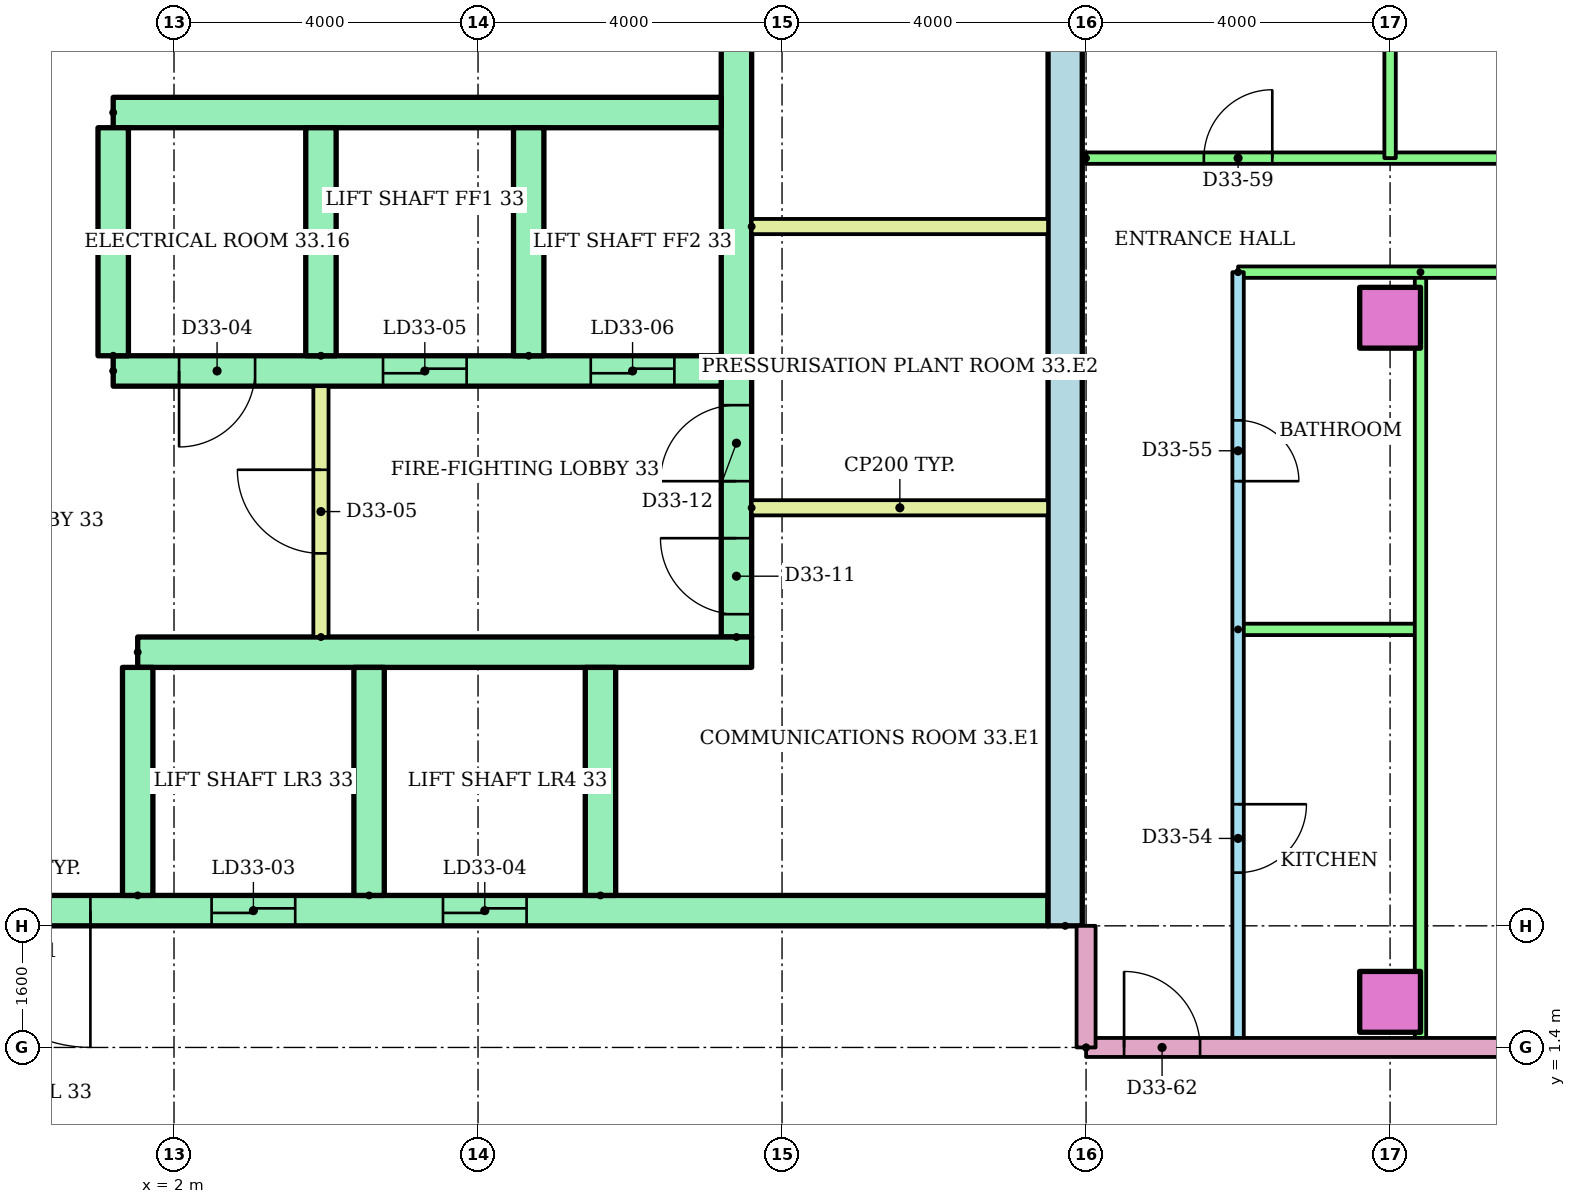
"""IFC4 building model, lengths in metres.
Left out: names, types, materials, properties, quantities, classifications, styles, units other than length and angle.
Written with IfcOpenShell. Run it as: python <this file> out.ifc"""

import sys

from ifc_helpers import new_model, si_unit, direction, frame, frame_2d, origin, origin_2d, place, context, subcontext, project, spatial, rectangle, extrude, element, fill, save


model = new_model("IFC4")
c1 = context("Model", 3, precision=1e-05, world=origin(), true_north=direction((0.0, 1.0)))
c2 = subcontext(c1, "Body", "Model", "MODEL_VIEW")
j1 = project(units=[si_unit("LENGTHUNIT", "METRE"), si_unit("PLANEANGLEUNIT", "RADIAN")], contexts=[c1])
p1 = place(None, origin())
s1 = spatial("IfcSite", under=j1, at=p1, CompositionType="ELEMENT")
p2 = place(p1, origin())
s2 = spatial("IfcBuilding", under=s1, at=p2, CompositionType="ELEMENT")
p3 = place(p2, frame((0.0, 0.0, 129.4)))
s3 = spatial("IfcBuildingStorey", under=s2, at=p3, CompositionType="ELEMENT", Elevation=129.4)
for number, where in (
    (1, (18.0, 2.0, 0.0)),
    (2, (18.0, 11.0, 0.0)),
):
    element("IfcColumn", number, at=place(p3, frame(where)), inside=s3, PredefinedType="COLUMN", context=c2, shape_type="SweptSolid", body=[
        extrude(rectangle(XDim=0.8, YDim=0.8, at=origin_2d()), origin(), (0.0, 0.0, 1.0), 3.2),
    ])
p4 = place(p3, frame((13.725, 3.0, 0.0), z_axis=(0.0, 0.0, 1.0), x_axis=(0.0, 1.0, 0.0)))
e3 = element("IfcWall", 3, at=p4, inside=s3, PredefinedType="SHEAR", context=c2, shape_type="SweptSolid", body=[
    extrude(rectangle(XDim=17.0, YDim=0.45, at=frame_2d((8.5, 0.0))), origin(), (0.0, 0.0, 1.0), 2.92),
])
p5 = place(p3, frame((9.4, 6.8, 0.0), z_axis=(0.0, 0.0, 1.0), x_axis=(0.0, 1.0, 0.0)))
e4 = element("IfcWall", 4, at=p5, inside=s3, PredefinedType="SHEAR", context=c2, shape_type="SweptSolid", body=[
    extrude(rectangle(XDim=12.7, YDim=0.4, at=frame_2d((6.35, 0.0))), origin(), (0.0, 0.0, 1.0), 2.92),
])
p6 = place(p5, frame((0.3, 0.0, 0.0)))
e5 = element("IfcOpeningElement", 5, at=p6, cuts=e4, PredefinedType="OPENING", context=c2, shape_type="SweptSolid", body=[
    extrude(rectangle(XDim=1.0, YDim=2.1, at=frame_2d((0.5, 1.05))), frame((0.0, 0.21, 0.0), z_axis=(0.0, -1.0, 0.0), x_axis=(1.0, 0.0, 0.0)), (0.0, 0.0, 1.0), 0.42),
])
p7 = place(p5, frame((2.05, 0.0, 0.0)))
e6 = element("IfcOpeningElement", 6, at=p7, cuts=e4, PredefinedType="OPENING", context=c2, shape_type="SweptSolid", body=[
    extrude(rectangle(XDim=1.0, YDim=2.1, at=frame_2d((0.5, 1.05))), frame((0.0, 0.21, 0.0), z_axis=(0.0, -1.0, 0.0), x_axis=(1.0, 0.0, 0.0)), (0.0, 0.0, 1.0), 0.42),
])
p8 = place(p5, frame((7.925, 0.0, 0.0)))
e7 = element("IfcOpeningElement", 7, at=p8, cuts=e4, PredefinedType="OPENING", context=c2, shape_type="SweptSolid", body=[
    extrude(rectangle(XDim=1.0, YDim=2.1, at=frame_2d((0.5, 1.05))), frame((0.0, 0.21, 0.0), z_axis=(0.0, -1.0, 0.0), x_axis=(1.0, 0.0, 0.0)), (0.0, 0.0, 1.0), 0.42),
])
p9 = place(p3, frame((-13.5, 3.2, 0.0)))
e8 = element("IfcWall", 8, at=p9, inside=s3, PredefinedType="SHEAR", context=c2, shape_type="SweptSolid", body=[
    extrude(rectangle(XDim=27.0, YDim=0.4, at=frame_2d((13.5, 0.0))), origin(), (0.0, 0.0, 1.0), 2.92),
])
p10 = place(p9, frame((6.861, 0.0, 0.0)))
e9 = element("IfcOpeningElement", 9, at=p10, cuts=e8, PredefinedType="OPENING", context=c2, shape_type="SweptSolid", body=[
    extrude(rectangle(XDim=1.1, YDim=2.1, at=frame_2d((0.55, 1.05))), frame((0.0, 0.21, 0.0), z_axis=(0.0, -1.0, 0.0), x_axis=(1.0, 0.0, 0.0)), (0.0, 0.0, 1.0), 0.42),
])
p11 = place(p9, frame((9.906, 0.0, 0.0)))
e10 = element("IfcOpeningElement", 10, at=p11, cuts=e8, PredefinedType="OPENING", context=c2, shape_type="SweptSolid", body=[
    extrude(rectangle(XDim=1.1, YDim=2.1, at=frame_2d((0.55, 1.05))), frame((0.0, 0.21, 0.0), z_axis=(0.0, -1.0, 0.0), x_axis=(1.0, 0.0, 0.0)), (0.0, 0.0, 1.0), 0.42),
])
p12 = place(p9, frame((15.994, 0.0, 0.0)))
e11 = element("IfcOpeningElement", 11, at=p12, cuts=e8, PredefinedType="OPENING", context=c2, shape_type="SweptSolid", body=[
    extrude(rectangle(XDim=1.1, YDim=2.1, at=frame_2d((0.55, 1.05))), frame((0.0, 0.21, 0.0), z_axis=(0.0, -1.0, 0.0), x_axis=(1.0, 0.0, 0.0)), (0.0, 0.0, 1.0), 0.42),
])
p13 = place(p9, frame((19.039, 0.0, 0.0)))
e12 = element("IfcOpeningElement", 12, at=p13, cuts=e8, PredefinedType="OPENING", context=c2, shape_type="SweptSolid", body=[
    extrude(rectangle(XDim=1.1, YDim=2.1, at=frame_2d((0.55, 1.05))), frame((0.0, 0.21, 0.0), z_axis=(0.0, -1.0, 0.0), x_axis=(1.0, 0.0, 0.0)), (0.0, 0.0, 1.0), 0.42),
])
p14 = place(p9, frame((12.6, 0.0, 0.0)))
e13 = element("IfcOpeningElement", 13, at=p14, cuts=e8, PredefinedType="OPENING", context=c2, shape_type="SweptSolid", body=[
    extrude(rectangle(XDim=1.8, YDim=2.1, at=frame_2d((0.9, 1.05))), frame((0.0, 0.21, 0.0), z_axis=(0.0, -1.0, 0.0), x_axis=(1.0, 0.0, 0.0)), (0.0, 0.0, 1.0), 0.42),
])
p15 = place(p3, frame((1.522, 6.6, 0.0)))
e14 = element("IfcWall", 14, at=p15, inside=s3, PredefinedType="SHEAR", context=c2, shape_type="SweptSolid", body=[
    extrude(rectangle(XDim=8.078, YDim=0.4, at=frame_2d((4.039, 0.0))), origin(), (0.0, 0.0, 1.0), 2.92),
])
for number, where, z_axis, x_axis in (
    (15, (1.522, 3.4, 0.0), (0.0, 0.0, 1.0), (0.0, 1.0, 0.0)),
    (16, (4.567, 3.4, 0.0), (0.0, 0.0, 1.0), (0.0, 1.0, 0.0)),
    (17, (7.611, 3.4, 0.0), (0.0, 0.0, 1.0), (0.0, 1.0, 0.0)),
):
    element("IfcWall", number, at=place(p3, frame(where, z_axis=z_axis, x_axis=x_axis)), inside=s3, PredefinedType="SHEAR", context=c2, shape_type="SweptSolid", body=[
        extrude(rectangle(XDim=3.0, YDim=0.4, at=frame_2d((1.5, 0.0))), origin(), (0.0, 0.0, 1.0), 2.92),
    ])
p16 = place(p3, frame((1.2, 10.3, 0.0)))
e18 = element("IfcWall", 18, at=p16, inside=s3, PredefinedType="SHEAR", context=c2, shape_type="SweptSolid", body=[
    extrude(rectangle(XDim=8.0, YDim=0.4, at=frame_2d((4.0, 0.0))), origin(), (0.0, 0.0, 1.0), 2.92),
])
p17 = place(p16, frame((3.55, 0.0, 0.0)))
e19 = element("IfcOpeningElement", 19, at=p17, cuts=e18, PredefinedType="OPENING", context=c2, shape_type="SweptSolid", body=[
    extrude(rectangle(XDim=1.1, YDim=2.1, at=frame_2d((0.55, 1.05))), frame((0.0, 0.21, 0.0), z_axis=(0.0, -1.0, 0.0), x_axis=(1.0, 0.0, 0.0)), (0.0, 0.0, 1.0), 0.42),
])
p18 = place(p16, frame((6.283, 0.0, 0.0)))
e20 = element("IfcOpeningElement", 20, at=p18, cuts=e18, PredefinedType="OPENING", context=c2, shape_type="SweptSolid", body=[
    extrude(rectangle(XDim=1.1, YDim=2.1, at=frame_2d((0.55, 1.05))), frame((0.0, 0.21, 0.0), z_axis=(0.0, -1.0, 0.0), x_axis=(1.0, 0.0, 0.0)), (0.0, 0.0, 1.0), 0.42),
])
p19 = place(p16, frame((0.867, 0.0, 0.0)))
e21 = element("IfcOpeningElement", 21, at=p19, cuts=e18, PredefinedType="OPENING", context=c2, shape_type="SweptSolid", body=[
    extrude(rectangle(XDim=1.0, YDim=2.1, at=frame_2d((0.5, 1.05))), frame((0.0, 0.21, 0.0), z_axis=(0.0, -1.0, 0.0), x_axis=(1.0, 0.0, 0.0)), (0.0, 0.0, 1.0), 0.42),
])
p20 = place(p3, frame((1.2, 13.7, 0.0)))
e22 = element("IfcWall", 22, at=p20, inside=s3, PredefinedType="SHEAR", context=c2, shape_type="SweptSolid", body=[
    extrude(rectangle(XDim=8.0, YDim=0.4, at=frame_2d((4.0, 0.0))), origin(), (0.0, 0.0, 1.0), 2.92),
])
for number, where, z_axis, x_axis in (
    (23, (1.2, 10.5, 0.0), (0.0, 0.0, 1.0), (0.0, 1.0, 0.0)),
    (24, (3.933, 10.5, 0.0), (0.0, 0.0, 1.0), (0.0, 1.0, 0.0)),
    (25, (6.667, 10.5, 0.0), (0.0, 0.0, 1.0), (0.0, 1.0, 0.0)),
):
    element("IfcWall", number, at=place(p3, frame(where, z_axis=z_axis, x_axis=x_axis)), inside=s3, PredefinedType="SHEAR", context=c2, shape_type="SweptSolid", body=[
        extrude(rectangle(XDim=3.0, YDim=0.4, at=frame_2d((1.5, 0.0))), origin(), (0.0, 0.0, 1.0), 2.92),
    ])
p21 = place(p3, frame((3.933, 6.8, 0.0), z_axis=(0.0, 0.0, 1.0), x_axis=(0.0, 1.0, 0.0)))
e26 = element("IfcWall", 26, at=p21, inside=s3, PredefinedType="PARTITIONING", context=c2, shape_type="SweptSolid", body=[
    extrude(rectangle(XDim=3.3, YDim=0.2, at=frame_2d((1.65, 0.0))), origin(), (0.0, 0.0, 1.0), 2.92),
])
p22 = place(p21, frame((1.1, 0.0, 0.0)))
e27 = element("IfcOpeningElement", 27, at=p22, cuts=e26, PredefinedType="OPENING", context=c2, shape_type="SweptSolid", body=[
    extrude(rectangle(XDim=1.1, YDim=2.1, at=frame_2d((0.55, 1.05))), frame((0.0, 0.11, 0.0), z_axis=(0.0, -1.0, 0.0), x_axis=(1.0, 0.0, 0.0)), (0.0, 0.0, 1.0), 0.22),
])
for number, where in (
    (28, (9.6, 8.5, 0.0)),
    (29, (9.6, 12.2, 0.0)),
):
    element("IfcWall", number, at=place(p3, frame(where)), inside=s3, PredefinedType="PARTITIONING", context=c2, shape_type="SweptSolid", body=[
        extrude(rectangle(XDim=3.9, YDim=0.2, at=frame_2d((1.95, 0.0))), origin(), (0.0, 0.0, 1.0), 2.92),
    ])
p23 = place(p3, frame((16.0, 11.6, 0.0), z_axis=(0.0, 0.0, 1.0), x_axis=(0.0, -1.0, 0.0)))
e30 = element("IfcWall", 30, at=p23, inside=s3, PredefinedType="PARTITIONING", context=c2, shape_type="SweptSolid", body=[
    extrude(rectangle(XDim=10.2, YDim=0.15, at=frame_2d((5.1, 0.0))), origin(), (0.0, 0.0, 1.0), 2.4),
])
p24 = place(p23, frame((7.0, 0.0, 0.0)))
e31 = element("IfcOpeningElement", 31, at=p24, cuts=e30, PredefinedType="OPENING", context=c2, shape_type="SweptSolid", body=[
    extrude(rectangle(XDim=0.9, YDim=2.1, at=frame_2d((0.45, 1.05))), frame((0.0, 0.085, 0.0), z_axis=(0.0, -1.0, 0.0), x_axis=(1.0, 0.0, 0.0)), (0.0, 0.0, 1.0), 0.17),
])
p25 = place(p23, frame((1.95, 0.0, 0.0)))
e32 = element("IfcOpeningElement", 32, at=p25, cuts=e30, PredefinedType="OPENING", context=c2, shape_type="SweptSolid", body=[
    extrude(rectangle(XDim=0.8, YDim=2.1, at=frame_2d((0.4, 1.05))), frame((0.0, 0.085, 0.0), z_axis=(0.0, -1.0, 0.0), x_axis=(1.0, 0.0, 0.0)), (0.0, 0.0, 1.0), 0.17),
])
p26 = place(p3, frame((16.0, 6.9, 0.0)))
e33 = element("IfcWall", 33, at=p26, inside=s3, PredefinedType="PARTITIONING", context=c2, shape_type="SweptSolid", body=[
    extrude(rectangle(XDim=2.4, YDim=0.15, at=frame_2d((1.2, 0.0))), origin(), (0.0, 0.0, 1.0), 2.4),
])
p27 = place(p3, frame((18.4, 11.6, 0.0), z_axis=(0.0, 0.0, 1.0), x_axis=(0.0, -1.0, 0.0)))
e34 = element("IfcWall", 34, at=p27, inside=s3, PredefinedType="PARTITIONING", context=c2, shape_type="SweptSolid", body=[
    extrude(rectangle(XDim=10.2, YDim=0.15, at=frame_2d((5.1, 0.0))), origin(), (0.0, 0.0, 1.0), 2.4),
])
p28 = place(p3, frame((32.72, 11.6, 0.0), z_axis=(0.0, 0.0, 1.0), x_axis=(-1.0, 0.0, 0.0)))
e35 = element("IfcWall", 35, at=p28, inside=s3, PredefinedType="PARTITIONING", context=c2, shape_type="SweptSolid", body=[
    extrude(rectangle(XDim=16.72, YDim=0.15, at=frame_2d((8.36, 0.0))), origin(), (0.0, 0.0, 1.0), 2.4),
])
p29 = place(p28, frame((10.87, 0.0, 0.0)))
e36 = element("IfcOpeningElement", 36, at=p29, cuts=e35, PredefinedType="OPENING", context=c2, shape_type="SweptSolid", body=[
    extrude(rectangle(XDim=0.9, YDim=2.1, at=frame_2d((0.45, 1.05))), frame((0.0, 0.085, 0.0), z_axis=(0.0, -1.0, 0.0), x_axis=(1.0, 0.0, 0.0)), (0.0, 0.0, 1.0), 0.17),
])
p30 = place(p28, frame((5.202, 0.0, 0.0)))
e37 = element("IfcOpeningElement", 37, at=p30, cuts=e35, PredefinedType="OPENING", context=c2, shape_type="SweptSolid", body=[
    extrude(rectangle(XDim=0.9, YDim=2.1, at=frame_2d((0.45, 1.05))), frame((0.0, 0.085, 0.0), z_axis=(0.0, -1.0, 0.0), x_axis=(1.0, 0.0, 0.0)), (0.0, 0.0, 1.0), 0.17),
])
p31 = place(p28, frame((1.445, 0.0, 0.0)))
e38 = element("IfcOpeningElement", 38, at=p31, cuts=e35, PredefinedType="OPENING", context=c2, shape_type="SweptSolid", body=[
    extrude(rectangle(XDim=0.9, YDim=2.1, at=frame_2d((0.45, 1.05))), frame((0.0, 0.085, 0.0), z_axis=(0.0, -1.0, 0.0), x_axis=(1.0, 0.0, 0.0)), (0.0, 0.0, 1.0), 0.17),
])
p32 = place(p3, frame((14.0, 13.1, 0.0)))
e39 = element("IfcWall", 39, at=p32, inside=s3, PredefinedType="PARTITIONING", context=c2, shape_type="SweptSolid", body=[
    extrude(rectangle(XDim=18.72, YDim=0.15, at=frame_2d((9.36, 0.0))), origin(), (0.0, 0.0, 1.0), 2.4),
])
p33 = place(p32, frame((1.55, 0.0, 0.0)))
e40 = element("IfcOpeningElement", 40, at=p33, cuts=e39, PredefinedType="OPENING", context=c2, shape_type="SweptSolid", body=[
    extrude(rectangle(XDim=0.9, YDim=2.1, at=frame_2d((0.45, 1.05))), frame((0.0, 0.085, 0.0), z_axis=(0.0, -1.0, 0.0), x_axis=(1.0, 0.0, 0.0)), (0.0, 0.0, 1.0), 0.17),
])
p34 = place(p32, frame((7.55, 0.0, 0.0)))
e41 = element("IfcOpeningElement", 41, at=p34, cuts=e39, PredefinedType="OPENING", context=c2, shape_type="SweptSolid", body=[
    extrude(rectangle(XDim=0.9, YDim=2.1, at=frame_2d((0.45, 1.05))), frame((0.0, 0.085, 0.0), z_axis=(0.0, -1.0, 0.0), x_axis=(1.0, 0.0, 0.0)), (0.0, 0.0, 1.0), 0.17),
])
p35 = place(p32, frame((14.75, 0.0, 0.0)))
e42 = element("IfcOpeningElement", 42, at=p35, cuts=e39, PredefinedType="OPENING", context=c2, shape_type="SweptSolid", body=[
    extrude(rectangle(XDim=1.0, YDim=2.1, at=frame_2d((0.5, 1.05))), frame((0.0, 0.085, 0.0), z_axis=(0.0, -1.0, 0.0), x_axis=(1.0, 0.0, 0.0)), (0.0, 0.0, 1.0), 0.17),
])
p36 = place(p3, frame((18.0, 18.721, 0.0), z_axis=(0.0, 0.0, 1.0), x_axis=(0.0, -1.0, 0.0)))
e43 = element("IfcWall", 43, at=p36, inside=s3, PredefinedType="PARTITIONING", context=c2, shape_type="SweptSolid", body=[
    extrude(rectangle(XDim=5.621, YDim=0.15, at=frame_2d((2.811, 0.0))), origin(), (0.0, 0.0, 1.0), 2.4),
])
p37 = place(p3, frame((14.0, 1.4, 0.0)))
e44 = element("IfcWall", 44, at=p37, inside=s3, PredefinedType="PARTITIONING", context=c2, shape_type="SweptSolid", body=[
    extrude(rectangle(XDim=15.0, YDim=0.25, at=frame_2d((7.5, 0.0))), origin(), (0.0, 0.0, 1.0), 2.4),
])
p38 = place(p37, frame((0.5, 0.0, 0.0)))
e45 = element("IfcOpeningElement", 45, at=p38, cuts=e44, PredefinedType="OPENING", context=c2, shape_type="SweptSolid", body=[
    extrude(rectangle(XDim=1.0, YDim=2.1, at=frame_2d((0.5, 1.05))), frame((0.0, 0.135, 0.0), z_axis=(0.0, -1.0, 0.0), x_axis=(1.0, 0.0, 0.0)), (0.0, 0.0, 1.0), 0.27),
])
p39 = place(p3, frame((14.0, 1.4, 0.0), z_axis=(0.0, 0.0, 1.0), x_axis=(0.0, 1.0, 0.0)))
e46 = element("IfcWall", 46, at=p39, inside=s3, PredefinedType="PARTITIONING", context=c2, shape_type="SweptSolid", body=[
    extrude(rectangle(XDim=1.6, YDim=0.25, at=frame_2d((0.8, 0.0))), origin(), (0.0, 0.0, 1.0), 2.4),
])
p40 = place(p12, origin())
e47 = element("IfcDoor", 47, at=p40, inside=s3, OperationType="SLIDING_TO_LEFT", PredefinedType="DOOR", context=c2, shape_type="SweptSolid", body=[
    extrude(rectangle(XDim=1.1, YDim=2.1, at=frame_2d((0.55, 1.05))), frame((0.0, 0.025, 0.0), z_axis=(0.0, -1.0, 0.0), x_axis=(1.0, 0.0, 0.0)), (0.0, 0.0, 1.0), 0.05),
])
fill(e11, e47)
p41 = place(p13, origin())
e48 = element("IfcDoor", 48, at=p41, inside=s3, OperationType="SLIDING_TO_LEFT", PredefinedType="DOOR", context=c2, shape_type="SweptSolid", body=[
    extrude(rectangle(XDim=1.1, YDim=2.1, at=frame_2d((0.55, 1.05))), frame((0.0, 0.025, 0.0), z_axis=(0.0, -1.0, 0.0), x_axis=(1.0, 0.0, 0.0)), (0.0, 0.0, 1.0), 0.05),
])
fill(e12, e48)
p42 = place(p14, frame((1.8, 0.0, 0.0), z_axis=(0.0, 0.0, 1.0), x_axis=(-1.0, 0.0, 0.0)))
e49 = element("IfcDoor", 49, at=p42, inside=s3, OperationType="DOUBLE_DOOR_SINGLE_SWING", PredefinedType="DOOR", context=c2, shape_type="SweptSolid", body=[
    extrude(rectangle(XDim=1.8, YDim=2.1, at=frame_2d((0.9, 1.05))), frame((0.0, 0.025, 0.0), z_axis=(0.0, -1.0, 0.0), x_axis=(1.0, 0.0, 0.0)), (0.0, 0.0, 1.0), 0.05),
])
fill(e13, e49)
p43 = place(p17, origin())
e50 = element("IfcDoor", 50, at=p43, inside=s3, OperationType="SLIDING_TO_LEFT", PredefinedType="DOOR", context=c2, shape_type="SweptSolid", body=[
    extrude(rectangle(XDim=1.1, YDim=2.1, at=frame_2d((0.55, 1.05))), frame((0.0, 0.025, 0.0), z_axis=(0.0, -1.0, 0.0), x_axis=(1.0, 0.0, 0.0)), (0.0, 0.0, 1.0), 0.05),
])
fill(e19, e50)
p44 = place(p18, origin())
e51 = element("IfcDoor", 51, at=p44, inside=s3, OperationType="SLIDING_TO_LEFT", PredefinedType="DOOR", context=c2, shape_type="SweptSolid", body=[
    extrude(rectangle(XDim=1.1, YDim=2.1, at=frame_2d((0.55, 1.05))), frame((0.0, 0.025, 0.0), z_axis=(0.0, -1.0, 0.0), x_axis=(1.0, 0.0, 0.0)), (0.0, 0.0, 1.0), 0.05),
])
fill(e20, e51)
p45 = place(p19, frame((1.0, 0.0, 0.0), z_axis=(0.0, 0.0, 1.0), x_axis=(-1.0, 0.0, 0.0)))
e52 = element("IfcDoor", 52, at=p45, inside=s3, OperationType="SINGLE_SWING_LEFT", PredefinedType="DOOR", context=c2, shape_type="SweptSolid", body=[
    extrude(rectangle(XDim=1.0, YDim=2.1, at=frame_2d((0.5, 1.05))), frame((0.0, 0.025, 0.0), z_axis=(0.0, -1.0, 0.0), x_axis=(1.0, 0.0, 0.0)), (0.0, 0.0, 1.0), 0.05),
])
fill(e21, e52)
p46 = place(p22, origin())
e53 = element("IfcDoor", 53, at=p46, inside=s3, OperationType="SINGLE_SWING_RIGHT", PredefinedType="DOOR", context=c2, shape_type="SweptSolid", body=[
    extrude(rectangle(XDim=1.1, YDim=2.1, at=frame_2d((0.55, 1.05))), frame((0.0, 0.025, 0.0), z_axis=(0.0, -1.0, 0.0), x_axis=(1.0, 0.0, 0.0)), (0.0, 0.0, 1.0), 0.05),
])
fill(e27, e53)
p47 = place(p6, origin())
e54 = element("IfcDoor", 54, at=p47, inside=s3, OperationType="SINGLE_SWING_RIGHT", PredefinedType="DOOR", context=c2, shape_type="SweptSolid", body=[
    extrude(rectangle(XDim=1.0, YDim=2.1, at=frame_2d((0.5, 1.05))), frame((0.0, 0.025, 0.0), z_axis=(0.0, -1.0, 0.0), x_axis=(1.0, 0.0, 0.0)), (0.0, 0.0, 1.0), 0.05),
])
fill(e5, e54)
p48 = place(p7, origin())
e55 = element("IfcDoor", 55, at=p48, inside=s3, OperationType="SINGLE_SWING_LEFT", PredefinedType="DOOR", context=c2, shape_type="SweptSolid", body=[
    extrude(rectangle(XDim=1.0, YDim=2.1, at=frame_2d((0.5, 1.05))), frame((0.0, 0.025, 0.0), z_axis=(0.0, -1.0, 0.0), x_axis=(1.0, 0.0, 0.0)), (0.0, 0.0, 1.0), 0.05),
])
fill(e6, e55)
p49 = place(p24, origin())
e56 = element("IfcDoor", 56, at=p49, inside=s3, OperationType="SINGLE_SWING_LEFT", PredefinedType="DOOR", context=c2, shape_type="SweptSolid", body=[
    extrude(rectangle(XDim=0.9, YDim=2.1, at=frame_2d((0.45, 1.05))), frame((0.0, 0.025, 0.0), z_axis=(0.0, -1.0, 0.0), x_axis=(1.0, 0.0, 0.0)), (0.0, 0.0, 1.0), 0.05),
])
fill(e31, e56)
p50 = place(p25, origin())
e57 = element("IfcDoor", 57, at=p50, inside=s3, OperationType="SINGLE_SWING_RIGHT", PredefinedType="DOOR", context=c2, shape_type="SweptSolid", body=[
    extrude(rectangle(XDim=0.8, YDim=2.1, at=frame_2d((0.4, 1.05))), frame((0.0, 0.025, 0.0), z_axis=(0.0, -1.0, 0.0), x_axis=(1.0, 0.0, 0.0)), (0.0, 0.0, 1.0), 0.05),
])
fill(e32, e57)
p51 = place(p33, origin())
e58 = element("IfcDoor", 58, at=p51, inside=s3, OperationType="SINGLE_SWING_RIGHT", PredefinedType="DOOR", context=c2, shape_type="SweptSolid", body=[
    extrude(rectangle(XDim=0.9, YDim=2.1, at=frame_2d((0.45, 1.05))), frame((0.0, 0.025, 0.0), z_axis=(0.0, -1.0, 0.0), x_axis=(1.0, 0.0, 0.0)), (0.0, 0.0, 1.0), 0.05),
])
fill(e40, e58)
p52 = place(p38, origin())
e59 = element("IfcDoor", 59, at=p52, inside=s3, OperationType="SINGLE_SWING_LEFT", PredefinedType="DOOR", context=c2, shape_type="SweptSolid", body=[
    extrude(rectangle(XDim=1.0, YDim=2.1, at=frame_2d((0.5, 1.05))), frame((0.0, 0.025, 0.0), z_axis=(0.0, -1.0, 0.0), x_axis=(1.0, 0.0, 0.0)), (0.0, 0.0, 1.0), 0.05),
])
fill(e45, e59)
save(model, sys.argv[1])
